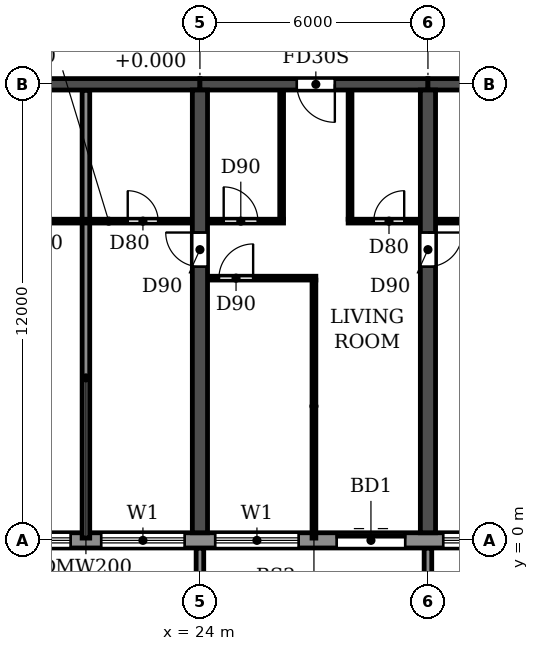
"""IFC4 building model, lengths in metres.
Left out: names, types, materials, properties, quantities, classifications, styles, units other than length and angle.
Written with IfcOpenShell. Run it as: python <this file> out.ifc"""

import sys

from ifc_helpers import new_model, si_unit, direction, frame, frame_2d, origin, place, context, subcontext, project, spatial, polyline, rectangle, outline, extrude, source, transform, mapped, element, fill, save


model = new_model("IFC4")
c1 = context("Model", 3, precision=1e-05, world=origin(), true_north=direction((0.0, 1.0)))
c2 = subcontext(c1, "Body", "Model", "MODEL_VIEW")
j1 = project(units=[si_unit("LENGTHUNIT", "METRE"), si_unit("PLANEANGLEUNIT", "RADIAN")], contexts=[c1])
p1 = place(None, origin())
s1 = spatial("IfcSite", under=j1, at=p1, CompositionType="ELEMENT")
p2 = place(p1, origin())
s2 = spatial("IfcBuilding", under=s1, at=p2, CompositionType="ELEMENT")
p3 = place(p2, frame((0.0, 0.0, 56.4)))
s3 = spatial("IfcBuildingStorey", under=s2, at=p3, CompositionType="ELEMENT", Elevation=56.4)
p4 = place(p3, frame((24.0, 0.2, 0.0), z_axis=(0.0, 0.0, 1.0), x_axis=(0.0, 1.0, 0.0)))
e1 = element("IfcWall", 1, at=p4, inside=s3, PredefinedType="SHEAR", context=c2, shape_type="SweptSolid", body=[
    extrude(rectangle(XDim=11.65, YDim=0.4, at=frame_2d((5.825, 0.0))), origin(), (0.0, 0.0, 1.0), 3.05),
])
p5 = place(p4, frame((7.0, 0.0, 0.0)))
e2 = element("IfcOpeningElement", 2, at=p5, cuts=e1, PredefinedType="OPENING", context=c2, shape_type="SweptSolid", body=[
    extrude(rectangle(XDim=0.9, YDim=2.1, at=frame_2d((0.45, 1.05))), frame((0.0, 0.21, 0.0), z_axis=(0.0, -1.0, 0.0), x_axis=(1.0, 0.0, 0.0)), (0.0, 0.0, 1.0), 0.42),
])
p6 = place(p3, frame((30.0, 0.2, 0.0), z_axis=(0.0, 0.0, 1.0), x_axis=(0.0, 1.0, 0.0)))
e3 = element("IfcWall", 3, at=p6, inside=s3, PredefinedType="SHEAR", context=c2, shape_type="SweptSolid", body=[
    extrude(rectangle(XDim=11.65, YDim=0.4, at=frame_2d((5.825, 0.0))), origin(), (0.0, 0.0, 1.0), 3.05),
])
p7 = place(p6, frame((7.0, 0.0, 0.0)))
e4 = element("IfcOpeningElement", 4, at=p7, cuts=e3, PredefinedType="OPENING", context=c2, shape_type="SweptSolid", body=[
    extrude(rectangle(XDim=0.9, YDim=2.1, at=frame_2d((0.45, 1.05))), frame((0.0, 0.21, 0.0), z_axis=(0.0, -1.0, 0.0), x_axis=(1.0, 0.0, 0.0)), (0.0, 0.0, 1.0), 0.42),
])
p8 = place(p3, frame((18.0, 12.0, 0.0), z_axis=(0.0, 0.0, 1.0), x_axis=(1.0, 0.0, 0.0)))
e5 = element("IfcWall", 5, at=p8, inside=s3, PredefinedType="SHEAR", context=c2, shape_type="SweptSolid", body=[
    extrude(rectangle(XDim=6.0, YDim=0.3, at=frame_2d((3.0, 0.0))), origin(), (0.0, 0.0, 1.0), 2.45),
])
p9 = place(p3, frame((24.0, 12.0, 0.0), z_axis=(0.0, 0.0, 1.0), x_axis=(1.0, 0.0, 0.0)))
e6 = element("IfcWall", 6, at=p9, inside=s3, PredefinedType="SHEAR", context=c2, shape_type="SweptSolid", body=[
    extrude(rectangle(XDim=6.0, YDim=0.3, at=frame_2d((3.0, 0.0))), origin(), (0.0, 0.0, 1.0), 2.45),
])
p10 = place(p9, frame((2.55, 0.0, 0.0)))
e7 = element("IfcOpeningElement", 7, at=p10, cuts=e6, PredefinedType="OPENING", context=c2, shape_type="SweptSolid", body=[
    extrude(rectangle(XDim=1.0, YDim=2.1, at=frame_2d((0.5, 1.05))), frame((0.0, 0.16, 0.0), z_axis=(0.0, -1.0, 0.0), x_axis=(1.0, 0.0, 0.0)), (0.0, 0.0, 1.0), 0.32),
])
p11 = place(p3, frame((30.0, 12.0, 0.0), z_axis=(0.0, 0.0, 1.0), x_axis=(1.0, 0.0, 0.0)))
e8 = element("IfcWall", 8, at=p11, inside=s3, PredefinedType="SHEAR", context=c2, shape_type="SweptSolid", body=[
    extrude(rectangle(XDim=6.0, YDim=0.3, at=frame_2d((3.0, 0.0))), origin(), (0.0, 0.0, 1.0), 2.45),
])
p12 = place(p3, frame((10.683, 0.0, 0.0), z_axis=(0.0, 0.0, 1.0), x_axis=(1.0, 0.0, 0.0)))
e9 = element("IfcWall", 9, at=p12, inside=s3, PredefinedType="STANDARD", context=c2, shape_type="SweptSolid", body=[
    extrude(rectangle(XDim=80.634, YDim=0.4, at=frame_2d((40.317, 0.0))), origin(), (0.0, 0.0, 1.0), 3.05),
])
p13 = place(p12, frame((1.717, 0.0, 0.9)))
e10 = element("IfcOpeningElement", 10, at=p13, cuts=e9, PredefinedType="OPENING", context=c2, shape_type="SweptSolid", body=[
    extrude(rectangle(XDim=2.2, YDim=1.5, at=frame_2d((1.1, 0.75))), frame((0.0, 0.21, 0.0), z_axis=(0.0, -1.0, 0.0), x_axis=(1.0, 0.0, 0.0)), (0.0, 0.0, 1.0), 0.42),
])
p14 = place(p12, frame((4.917, 0.0, 0.0)))
e11 = element("IfcOpeningElement", 11, at=p14, cuts=e9, PredefinedType="OPENING", context=c2, shape_type="SweptSolid", body=[
    extrude(rectangle(XDim=1.8, YDim=2.4, at=frame_2d((0.9, 1.2))), frame((0.0, 0.21, 0.0), z_axis=(0.0, -1.0, 0.0), x_axis=(1.0, 0.0, 0.0)), (0.0, 0.0, 1.0), 0.42),
])
p15 = place(p12, frame((7.717, 0.0, 0.9)))
e12 = element("IfcOpeningElement", 12, at=p15, cuts=e9, PredefinedType="OPENING", context=c2, shape_type="SweptSolid", body=[
    extrude(rectangle(XDim=2.2, YDim=1.5, at=frame_2d((1.1, 0.75))), frame((0.0, 0.21, 0.0), z_axis=(0.0, -1.0, 0.0), x_axis=(1.0, 0.0, 0.0)), (0.0, 0.0, 1.0), 0.42),
])
p16 = place(p12, frame((10.717, 0.0, 0.9)))
e13 = element("IfcOpeningElement", 13, at=p16, cuts=e9, PredefinedType="OPENING", context=c2, shape_type="SweptSolid", body=[
    extrude(rectangle(XDim=2.2, YDim=1.5, at=frame_2d((1.1, 0.75))), frame((0.0, 0.21, 0.0), z_axis=(0.0, -1.0, 0.0), x_axis=(1.0, 0.0, 0.0)), (0.0, 0.0, 1.0), 0.42),
])
p17 = place(p12, frame((13.717, 0.0, 0.9)))
e14 = element("IfcOpeningElement", 14, at=p17, cuts=e9, PredefinedType="OPENING", context=c2, shape_type="SweptSolid", body=[
    extrude(rectangle(XDim=2.2, YDim=1.5, at=frame_2d((1.1, 0.75))), frame((0.0, 0.21, 0.0), z_axis=(0.0, -1.0, 0.0), x_axis=(1.0, 0.0, 0.0)), (0.0, 0.0, 1.0), 0.42),
])
p18 = place(p12, frame((16.917, 0.0, 0.0)))
e15 = element("IfcOpeningElement", 15, at=p18, cuts=e9, PredefinedType="OPENING", context=c2, shape_type="SweptSolid", body=[
    extrude(rectangle(XDim=1.8, YDim=2.4, at=frame_2d((0.9, 1.2))), frame((0.0, 0.21, 0.0), z_axis=(0.0, -1.0, 0.0), x_axis=(1.0, 0.0, 0.0)), (0.0, 0.0, 1.0), 0.42),
])
p19 = place(p12, frame((19.717, 0.0, 0.9)))
e16 = element("IfcOpeningElement", 16, at=p19, cuts=e9, PredefinedType="OPENING", context=c2, shape_type="SweptSolid", body=[
    extrude(rectangle(XDim=2.2, YDim=1.5, at=frame_2d((1.1, 0.75))), frame((0.0, 0.21, 0.0), z_axis=(0.0, -1.0, 0.0), x_axis=(1.0, 0.0, 0.0)), (0.0, 0.0, 1.0), 0.42),
])
p20 = place(p12, frame((22.717, 0.0, 0.9)))
e17 = element("IfcOpeningElement", 17, at=p20, cuts=e9, PredefinedType="OPENING", context=c2, shape_type="SweptSolid", body=[
    extrude(rectangle(XDim=2.2, YDim=1.5, at=frame_2d((1.1, 0.75))), frame((0.0, 0.21, 0.0), z_axis=(0.0, -1.0, 0.0), x_axis=(1.0, 0.0, 0.0)), (0.0, 0.0, 1.0), 0.42),
])
p21 = place(p12, frame((25.917, 0.0, 0.0)))
e18 = element("IfcOpeningElement", 18, at=p21, cuts=e9, PredefinedType="OPENING", context=c2, shape_type="SweptSolid", body=[
    extrude(rectangle(XDim=1.8, YDim=2.4, at=frame_2d((0.9, 1.2))), frame((0.0, 0.21, 0.0), z_axis=(0.0, -1.0, 0.0), x_axis=(1.0, 0.0, 0.0)), (0.0, 0.0, 1.0), 0.42),
])
p22 = place(p12, frame((28.717, 0.0, 0.9)))
e19 = element("IfcOpeningElement", 19, at=p22, cuts=e9, PredefinedType="OPENING", context=c2, shape_type="SweptSolid", body=[
    extrude(rectangle(XDim=2.2, YDim=1.5, at=frame_2d((1.1, 0.75))), frame((0.0, 0.21, 0.0), z_axis=(0.0, -1.0, 0.0), x_axis=(1.0, 0.0, 0.0)), (0.0, 0.0, 1.0), 0.42),
])
p23 = place(p12, frame((31.717, 0.0, 0.9)))
e20 = element("IfcOpeningElement", 20, at=p23, cuts=e9, PredefinedType="OPENING", context=c2, shape_type="SweptSolid", body=[
    extrude(rectangle(XDim=2.2, YDim=1.5, at=frame_2d((1.1, 0.75))), frame((0.0, 0.21, 0.0), z_axis=(0.0, -1.0, 0.0), x_axis=(1.0, 0.0, 0.0)), (0.0, 0.0, 1.0), 0.42),
])
p24 = place(p12, frame((34.717, 0.0, 0.9)))
e21 = element("IfcOpeningElement", 21, at=p24, cuts=e9, PredefinedType="OPENING", context=c2, shape_type="SweptSolid", body=[
    extrude(rectangle(XDim=2.2, YDim=1.5, at=frame_2d((1.1, 0.75))), frame((0.0, 0.21, 0.0), z_axis=(0.0, -1.0, 0.0), x_axis=(1.0, 0.0, 0.0)), (0.0, 0.0, 1.0), 0.42),
])
p25 = place(p12, frame((37.717, 0.0, 0.9)))
e22 = element("IfcOpeningElement", 22, at=p25, cuts=e9, PredefinedType="OPENING", context=c2, shape_type="SweptSolid", body=[
    extrude(rectangle(XDim=2.2, YDim=1.5, at=frame_2d((1.1, 0.75))), frame((0.0, 0.21, 0.0), z_axis=(0.0, -1.0, 0.0), x_axis=(1.0, 0.0, 0.0)), (0.0, 0.0, 1.0), 0.42),
])
p26 = place(p12, frame((40.917, 0.0, 0.0)))
e23 = element("IfcOpeningElement", 23, at=p26, cuts=e9, PredefinedType="OPENING", context=c2, shape_type="SweptSolid", body=[
    extrude(rectangle(XDim=1.8, YDim=2.4, at=frame_2d((0.9, 1.2))), frame((0.0, 0.21, 0.0), z_axis=(0.0, -1.0, 0.0), x_axis=(1.0, 0.0, 0.0)), (0.0, 0.0, 1.0), 0.42),
])
p27 = place(p12, frame((43.717, 0.0, 0.9)))
e24 = element("IfcOpeningElement", 24, at=p27, cuts=e9, PredefinedType="OPENING", context=c2, shape_type="SweptSolid", body=[
    extrude(rectangle(XDim=2.2, YDim=1.5, at=frame_2d((1.1, 0.75))), frame((0.0, 0.21, 0.0), z_axis=(0.0, -1.0, 0.0), x_axis=(1.0, 0.0, 0.0)), (0.0, 0.0, 1.0), 0.42),
])
p28 = place(p12, frame((46.717, 0.0, 0.9)))
e25 = element("IfcOpeningElement", 25, at=p28, cuts=e9, PredefinedType="OPENING", context=c2, shape_type="SweptSolid", body=[
    extrude(rectangle(XDim=2.2, YDim=1.5, at=frame_2d((1.1, 0.75))), frame((0.0, 0.21, 0.0), z_axis=(0.0, -1.0, 0.0), x_axis=(1.0, 0.0, 0.0)), (0.0, 0.0, 1.0), 0.42),
])
p29 = place(p12, frame((49.717, 0.0, 0.9)))
e26 = element("IfcOpeningElement", 26, at=p29, cuts=e9, PredefinedType="OPENING", context=c2, shape_type="SweptSolid", body=[
    extrude(rectangle(XDim=2.2, YDim=1.5, at=frame_2d((1.1, 0.75))), frame((0.0, 0.21, 0.0), z_axis=(0.0, -1.0, 0.0), x_axis=(1.0, 0.0, 0.0)), (0.0, 0.0, 1.0), 0.42),
])
p30 = place(p12, frame((52.717, 0.0, 0.9)))
e27 = element("IfcOpeningElement", 27, at=p30, cuts=e9, PredefinedType="OPENING", context=c2, shape_type="SweptSolid", body=[
    extrude(rectangle(XDim=2.2, YDim=1.5, at=frame_2d((1.1, 0.75))), frame((0.0, 0.21, 0.0), z_axis=(0.0, -1.0, 0.0), x_axis=(1.0, 0.0, 0.0)), (0.0, 0.0, 1.0), 0.42),
])
p31 = place(p12, frame((55.717, 0.0, 0.9)))
e28 = element("IfcOpeningElement", 28, at=p31, cuts=e9, PredefinedType="OPENING", context=c2, shape_type="SweptSolid", body=[
    extrude(rectangle(XDim=2.2, YDim=1.5, at=frame_2d((1.1, 0.75))), frame((0.0, 0.21, 0.0), z_axis=(0.0, -1.0, 0.0), x_axis=(1.0, 0.0, 0.0)), (0.0, 0.0, 1.0), 0.42),
])
p32 = place(p12, frame((58.717, 0.0, 0.9)))
e29 = element("IfcOpeningElement", 29, at=p32, cuts=e9, PredefinedType="OPENING", context=c2, shape_type="SweptSolid", body=[
    extrude(rectangle(XDim=2.2, YDim=1.5, at=frame_2d((1.1, 0.75))), frame((0.0, 0.21, 0.0), z_axis=(0.0, -1.0, 0.0), x_axis=(1.0, 0.0, 0.0)), (0.0, 0.0, 1.0), 0.42),
])
p33 = place(p12, frame((61.717, 0.0, 0.9)))
e30 = element("IfcOpeningElement", 30, at=p33, cuts=e9, PredefinedType="OPENING", context=c2, shape_type="SweptSolid", body=[
    extrude(rectangle(XDim=2.2, YDim=1.5, at=frame_2d((1.1, 0.75))), frame((0.0, 0.21, 0.0), z_axis=(0.0, -1.0, 0.0), x_axis=(1.0, 0.0, 0.0)), (0.0, 0.0, 1.0), 0.42),
])
p34 = place(p12, frame((64.917, 0.0, 0.0)))
e31 = element("IfcOpeningElement", 31, at=p34, cuts=e9, PredefinedType="OPENING", context=c2, shape_type="SweptSolid", body=[
    extrude(rectangle(XDim=1.8, YDim=2.4, at=frame_2d((0.9, 1.2))), frame((0.0, 0.21, 0.0), z_axis=(0.0, -1.0, 0.0), x_axis=(1.0, 0.0, 0.0)), (0.0, 0.0, 1.0), 0.42),
])
p35 = place(p12, frame((67.717, 0.0, 0.9)))
e32 = element("IfcOpeningElement", 32, at=p35, cuts=e9, PredefinedType="OPENING", context=c2, shape_type="SweptSolid", body=[
    extrude(rectangle(XDim=2.2, YDim=1.5, at=frame_2d((1.1, 0.75))), frame((0.0, 0.21, 0.0), z_axis=(0.0, -1.0, 0.0), x_axis=(1.0, 0.0, 0.0)), (0.0, 0.0, 1.0), 0.42),
])
p36 = place(p12, frame((70.717, 0.0, 0.9)))
e33 = element("IfcOpeningElement", 33, at=p36, cuts=e9, PredefinedType="OPENING", context=c2, shape_type="SweptSolid", body=[
    extrude(rectangle(XDim=2.2, YDim=1.5, at=frame_2d((1.1, 0.75))), frame((0.0, 0.21, 0.0), z_axis=(0.0, -1.0, 0.0), x_axis=(1.0, 0.0, 0.0)), (0.0, 0.0, 1.0), 0.42),
])
p37 = place(p12, frame((73.717, 0.0, 0.9)))
e34 = element("IfcOpeningElement", 34, at=p37, cuts=e9, PredefinedType="OPENING", context=c2, shape_type="SweptSolid", body=[
    extrude(rectangle(XDim=2.2, YDim=1.5, at=frame_2d((1.1, 0.75))), frame((0.0, 0.21, 0.0), z_axis=(0.0, -1.0, 0.0), x_axis=(1.0, 0.0, 0.0)), (0.0, 0.0, 1.0), 0.42),
])
p38 = place(p12, frame((76.917, 0.0, 0.0)))
e35 = element("IfcOpeningElement", 35, at=p38, cuts=e9, PredefinedType="OPENING", context=c2, shape_type="SweptSolid", body=[
    extrude(rectangle(XDim=1.8, YDim=2.4, at=frame_2d((0.9, 1.2))), frame((0.0, 0.21, 0.0), z_axis=(0.0, -1.0, 0.0), x_axis=(1.0, 0.0, 0.0)), (0.0, 0.0, 1.0), 0.42),
])
m1 = source(origin(), c2, "Body", "SweptSolid", [
    extrude(outline(polyline([(0.0, 0.0), (0.2, 0.0), (0.2, 1.65), (0.0, 1.65), (0.0, 0.0)])), origin(), (0.0, 0.0, 1.0), 3.1),
])
for number, where in (
    (36, (23.9, -1.85, 0.0)),
    (37, (29.9, -1.85, 0.0)),
):
    element("IfcWall", number, at=place(p3, frame(where)), inside=s3, PredefinedType="STANDARD", context=c2, shape_type="MappedRepresentation", body=[
        mapped(m1, transform((0.0, 0.0, 0.0))),
    ])
p39 = place(p3, frame((21.0, 0.06, 0.0), z_axis=(0.0, 0.0, 1.0), x_axis=(0.0, 1.0, 0.0)))
e38 = element("IfcWall", 38, at=p39, inside=s3, PredefinedType="PARTITIONING", context=c2, shape_type="SweptSolid", body=[
    extrude(rectangle(XDim=11.78, YDim=0.2, at=frame_2d((5.89, 0.0))), origin(), (0.0, 0.0, 1.0), 3.05),
])
p40 = place(p3, frame((24.21, 6.9, 0.0), z_axis=(0.0, 0.0, 1.0), x_axis=(1.0, 0.0, 0.0)))
e39 = element("IfcWall", 39, at=p40, inside=s3, PredefinedType="PARTITIONING", context=c2, shape_type="SweptSolid", body=[
    extrude(rectangle(XDim=2.84, YDim=0.1, at=frame_2d((1.42, 0.0))), origin(), (0.0, 0.0, 1.0), 3.05),
])
p41 = place(p40, frame((0.29, 0.0, 0.0)))
e40 = element("IfcOpeningElement", 40, at=p41, cuts=e39, PredefinedType="OPENING", context=c2, shape_type="SweptSolid", body=[
    extrude(rectangle(XDim=0.9, YDim=2.1, at=frame_2d((0.45, 1.05))), frame((0.0, 0.06, 0.0), z_axis=(0.0, -1.0, 0.0), x_axis=(1.0, 0.0, 0.0)), (0.0, 0.0, 1.0), 0.12),
])
p42 = place(p3, frame((18.21, 8.4, 0.0), z_axis=(0.0, 0.0, 1.0), x_axis=(1.0, 0.0, 0.0)))
e41 = element("IfcWall", 41, at=p42, inside=s3, PredefinedType="PARTITIONING", context=c2, shape_type="SweptSolid", body=[
    extrude(rectangle(XDim=5.58, YDim=0.1, at=frame_2d((2.79, 0.0))), origin(), (0.0, 0.0, 1.0), 3.05),
])
p43 = place(p42, frame((0.89, 0.0, 0.0)))
e42 = element("IfcOpeningElement", 42, at=p43, cuts=e41, PredefinedType="OPENING", context=c2, shape_type="SweptSolid", body=[
    extrude(rectangle(XDim=0.8, YDim=2.1, at=frame_2d((0.4, 1.05))), frame((0.0, 0.06, 0.0), z_axis=(0.0, -1.0, 0.0), x_axis=(1.0, 0.0, 0.0)), (0.0, 0.0, 1.0), 0.12),
])
p44 = place(p42, frame((3.89, 0.0, 0.0)))
e43 = element("IfcOpeningElement", 43, at=p44, cuts=e41, PredefinedType="OPENING", context=c2, shape_type="SweptSolid", body=[
    extrude(rectangle(XDim=0.8, YDim=2.1, at=frame_2d((0.4, 1.05))), frame((0.0, 0.06, 0.0), z_axis=(0.0, -1.0, 0.0), x_axis=(1.0, 0.0, 0.0)), (0.0, 0.0, 1.0), 0.12),
])
p45 = place(p3, frame((24.21, 8.4, 0.0), z_axis=(0.0, 0.0, 1.0), x_axis=(1.0, 0.0, 0.0)))
e44 = element("IfcWall", 44, at=p45, inside=s3, PredefinedType="PARTITIONING", context=c2, shape_type="SweptSolid", body=[
    extrude(rectangle(XDim=1.99, YDim=0.1, at=frame_2d((0.995, 0.0))), origin(), (0.0, 0.0, 1.0), 3.05),
])
p46 = place(p45, frame((0.415, 0.0, 0.0)))
e45 = element("IfcOpeningElement", 45, at=p46, cuts=e44, PredefinedType="OPENING", context=c2, shape_type="SweptSolid", body=[
    extrude(rectangle(XDim=0.9, YDim=2.1, at=frame_2d((0.45, 1.05))), frame((0.0, 0.06, 0.0), z_axis=(0.0, -1.0, 0.0), x_axis=(1.0, 0.0, 0.0)), (0.0, 0.0, 1.0), 0.12),
])
p47 = place(p3, frame((27.9, 8.4, 0.0), z_axis=(0.0, 0.0, 1.0), x_axis=(1.0, 0.0, 0.0)))
e46 = element("IfcWall", 46, at=p47, inside=s3, PredefinedType="PARTITIONING", context=c2, shape_type="SweptSolid", body=[
    extrude(rectangle(XDim=1.89, YDim=0.1, at=frame_2d((0.945, 0.0))), origin(), (0.0, 0.0, 1.0), 3.05),
])
p48 = place(p47, frame((0.675, 0.0, 0.0)))
e47 = element("IfcOpeningElement", 47, at=p48, cuts=e46, PredefinedType="OPENING", context=c2, shape_type="SweptSolid", body=[
    extrude(rectangle(XDim=0.8, YDim=2.1, at=frame_2d((0.4, 1.05))), frame((0.0, 0.06, 0.0), z_axis=(0.0, -1.0, 0.0), x_axis=(1.0, 0.0, 0.0)), (0.0, 0.0, 1.0), 0.12),
])
p49 = place(p3, frame((30.21, 8.4, 0.0), z_axis=(0.0, 0.0, 1.0), x_axis=(1.0, 0.0, 0.0)))
e48 = element("IfcWall", 48, at=p49, inside=s3, PredefinedType="PARTITIONING", context=c2, shape_type="SweptSolid", body=[
    extrude(rectangle(XDim=2.69, YDim=0.1, at=frame_2d((1.345, 0.0))), origin(), (0.0, 0.0, 1.0), 3.05),
])
p50 = place(p49, frame((0.89, 0.0, 0.0)))
e49 = element("IfcOpeningElement", 49, at=p50, cuts=e48, PredefinedType="OPENING", context=c2, shape_type="SweptSolid", body=[
    extrude(rectangle(XDim=0.8, YDim=2.1, at=frame_2d((0.4, 1.05))), frame((0.0, 0.06, 0.0), z_axis=(0.0, -1.0, 0.0), x_axis=(1.0, 0.0, 0.0)), (0.0, 0.0, 1.0), 0.12),
])
p51 = place(p3, frame((26.15, 8.45, 0.0), z_axis=(0.0, 0.0, 1.0), x_axis=(0.0, 1.0, 0.0)))
e50 = element("IfcWall", 50, at=p51, inside=s3, PredefinedType="PARTITIONING", context=c2, shape_type="SweptSolid", body=[
    extrude(rectangle(XDim=3.39, YDim=0.1, at=frame_2d((1.695, 0.0))), origin(), (0.0, 0.0, 1.0), 3.05),
])
p52 = place(p3, frame((27.0, 0.06, 0.0), z_axis=(0.0, 0.0, 1.0), x_axis=(0.0, 1.0, 0.0)))
e51 = element("IfcWall", 51, at=p52, inside=s3, PredefinedType="PARTITIONING", context=c2, shape_type="SweptSolid", body=[
    extrude(rectangle(XDim=6.79, YDim=0.1, at=frame_2d((3.395, 0.0))), origin(), (0.0, 0.0, 1.0), 3.05),
])
p53 = place(p3, frame((27.95, 8.45, 0.0), z_axis=(0.0, 0.0, 1.0), x_axis=(0.0, 1.0, 0.0)))
e52 = element("IfcWall", 52, at=p53, inside=s3, PredefinedType="PARTITIONING", context=c2, shape_type="SweptSolid", body=[
    extrude(rectangle(XDim=3.39, YDim=0.1, at=frame_2d((1.695, 0.0))), origin(), (0.0, 0.0, 1.0), 3.05),
])
p54 = place(p15, origin())
e53 = element("IfcWindow", 53, at=p54, inside=s3, PartitioningType="DOUBLE_PANEL_HORIZONTAL", PredefinedType="WINDOW", context=c2, shape_type="SweptSolid", body=[
    extrude(rectangle(XDim=2.2, YDim=1.5, at=frame_2d((1.1, 0.75))), frame((0.0, 0.03, 0.0), z_axis=(0.0, -1.0, 0.0), x_axis=(1.0, 0.0, 0.0)), (0.0, 0.0, 1.0), 0.06),
])
fill(e12, e53)
p55 = place(p16, origin())
e54 = element("IfcWindow", 54, at=p55, inside=s3, PartitioningType="DOUBLE_PANEL_HORIZONTAL", PredefinedType="WINDOW", context=c2, shape_type="SweptSolid", body=[
    extrude(rectangle(XDim=2.2, YDim=1.5, at=frame_2d((1.1, 0.75))), frame((0.0, 0.03, 0.0), z_axis=(0.0, -1.0, 0.0), x_axis=(1.0, 0.0, 0.0)), (0.0, 0.0, 1.0), 0.06),
])
fill(e13, e54)
p56 = place(p17, origin())
e55 = element("IfcWindow", 55, at=p56, inside=s3, PartitioningType="DOUBLE_PANEL_HORIZONTAL", PredefinedType="WINDOW", context=c2, shape_type="SweptSolid", body=[
    extrude(rectangle(XDim=2.2, YDim=1.5, at=frame_2d((1.1, 0.75))), frame((0.0, 0.03, 0.0), z_axis=(0.0, -1.0, 0.0), x_axis=(1.0, 0.0, 0.0)), (0.0, 0.0, 1.0), 0.06),
])
fill(e14, e55)
p57 = place(p18, origin())
e56 = element("IfcDoor", 56, at=p57, inside=s3, OperationType="DOUBLE_DOOR_SLIDING", PredefinedType="DOOR", context=c2, shape_type="SweptSolid", body=[
    extrude(rectangle(XDim=1.8, YDim=2.4, at=frame_2d((0.9, 1.2))), frame((0.0, 0.025, 0.0), z_axis=(0.0, -1.0, 0.0), x_axis=(1.0, 0.0, 0.0)), (0.0, 0.0, 1.0), 0.05),
])
fill(e15, e56)
p58 = place(p19, origin())
e57 = element("IfcWindow", 57, at=p58, inside=s3, PartitioningType="DOUBLE_PANEL_HORIZONTAL", PredefinedType="WINDOW", context=c2, shape_type="SweptSolid", body=[
    extrude(rectangle(XDim=2.2, YDim=1.5, at=frame_2d((1.1, 0.75))), frame((0.0, 0.03, 0.0), z_axis=(0.0, -1.0, 0.0), x_axis=(1.0, 0.0, 0.0)), (0.0, 0.0, 1.0), 0.06),
])
fill(e16, e57)
p59 = place(p44, origin())
e58 = element("IfcDoor", 58, at=p59, inside=s3, OperationType="SINGLE_SWING_LEFT", PredefinedType="DOOR", context=c2, shape_type="SweptSolid", body=[
    extrude(rectangle(XDim=0.8, YDim=2.1, at=frame_2d((0.4, 1.05))), frame((0.0, 0.025, 0.0), z_axis=(0.0, -1.0, 0.0), x_axis=(1.0, 0.0, 0.0)), (0.0, 0.0, 1.0), 0.05),
])
fill(e43, e58)
p60 = place(p5, origin())
e59 = element("IfcDoor", 59, at=p60, inside=s3, OperationType="SINGLE_SWING_RIGHT", PredefinedType="DOOR", context=c2, shape_type="SweptSolid", body=[
    extrude(rectangle(XDim=0.9, YDim=2.1, at=frame_2d((0.45, 1.05))), frame((0.0, 0.025, 0.0), z_axis=(0.0, -1.0, 0.0), x_axis=(1.0, 0.0, 0.0)), (0.0, 0.0, 1.0), 0.05),
])
fill(e2, e59)
p61 = place(p41, origin())
e60 = element("IfcDoor", 60, at=p61, inside=s3, OperationType="SINGLE_SWING_RIGHT", PredefinedType="DOOR", context=c2, shape_type="SweptSolid", body=[
    extrude(rectangle(XDim=0.9, YDim=2.1, at=frame_2d((0.45, 1.05))), frame((0.0, 0.025, 0.0), z_axis=(0.0, -1.0, 0.0), x_axis=(1.0, 0.0, 0.0)), (0.0, 0.0, 1.0), 0.05),
])
fill(e40, e60)
p62 = place(p46, origin())
e61 = element("IfcDoor", 61, at=p62, inside=s3, OperationType="SINGLE_SWING_LEFT", PredefinedType="DOOR", context=c2, shape_type="SweptSolid", body=[
    extrude(rectangle(XDim=0.9, YDim=2.1, at=frame_2d((0.45, 1.05))), frame((0.0, 0.025, 0.0), z_axis=(0.0, -1.0, 0.0), x_axis=(1.0, 0.0, 0.0)), (0.0, 0.0, 1.0), 0.05),
])
fill(e45, e61)
p63 = place(p10, frame((1.0, 0.0, 0.0), z_axis=(0.0, 0.0, 1.0), x_axis=(-1.0, 0.0, 0.0)))
e62 = element("IfcDoor", 62, at=p63, inside=s3, OperationType="SINGLE_SWING_LEFT", PredefinedType="DOOR", context=c2, shape_type="SweptSolid", body=[
    extrude(rectangle(XDim=1.0, YDim=2.1, at=frame_2d((0.5, 1.05))), frame((0.0, 0.025, 0.0), z_axis=(0.0, -1.0, 0.0), x_axis=(1.0, 0.0, 0.0)), (0.0, 0.0, 1.0), 0.05),
])
fill(e7, e62)
p64 = place(p48, origin())
e63 = element("IfcDoor", 63, at=p64, inside=s3, OperationType="SINGLE_SWING_RIGHT", PredefinedType="DOOR", context=c2, shape_type="SweptSolid", body=[
    extrude(rectangle(XDim=0.8, YDim=2.1, at=frame_2d((0.4, 1.05))), frame((0.0, 0.025, 0.0), z_axis=(0.0, -1.0, 0.0), x_axis=(1.0, 0.0, 0.0)), (0.0, 0.0, 1.0), 0.05),
])
fill(e47, e63)
p65 = place(p7, frame((0.9, 0.0, 0.0), z_axis=(0.0, 0.0, 1.0), x_axis=(-1.0, 0.0, 0.0)))
e64 = element("IfcDoor", 64, at=p65, inside=s3, OperationType="SINGLE_SWING_LEFT", PredefinedType="DOOR", context=c2, shape_type="SweptSolid", body=[
    extrude(rectangle(XDim=0.9, YDim=2.1, at=frame_2d((0.45, 1.05))), frame((0.0, 0.025, 0.0), z_axis=(0.0, -1.0, 0.0), x_axis=(1.0, 0.0, 0.0)), (0.0, 0.0, 1.0), 0.05),
])
fill(e4, e64)
save(model, sys.argv[1])
